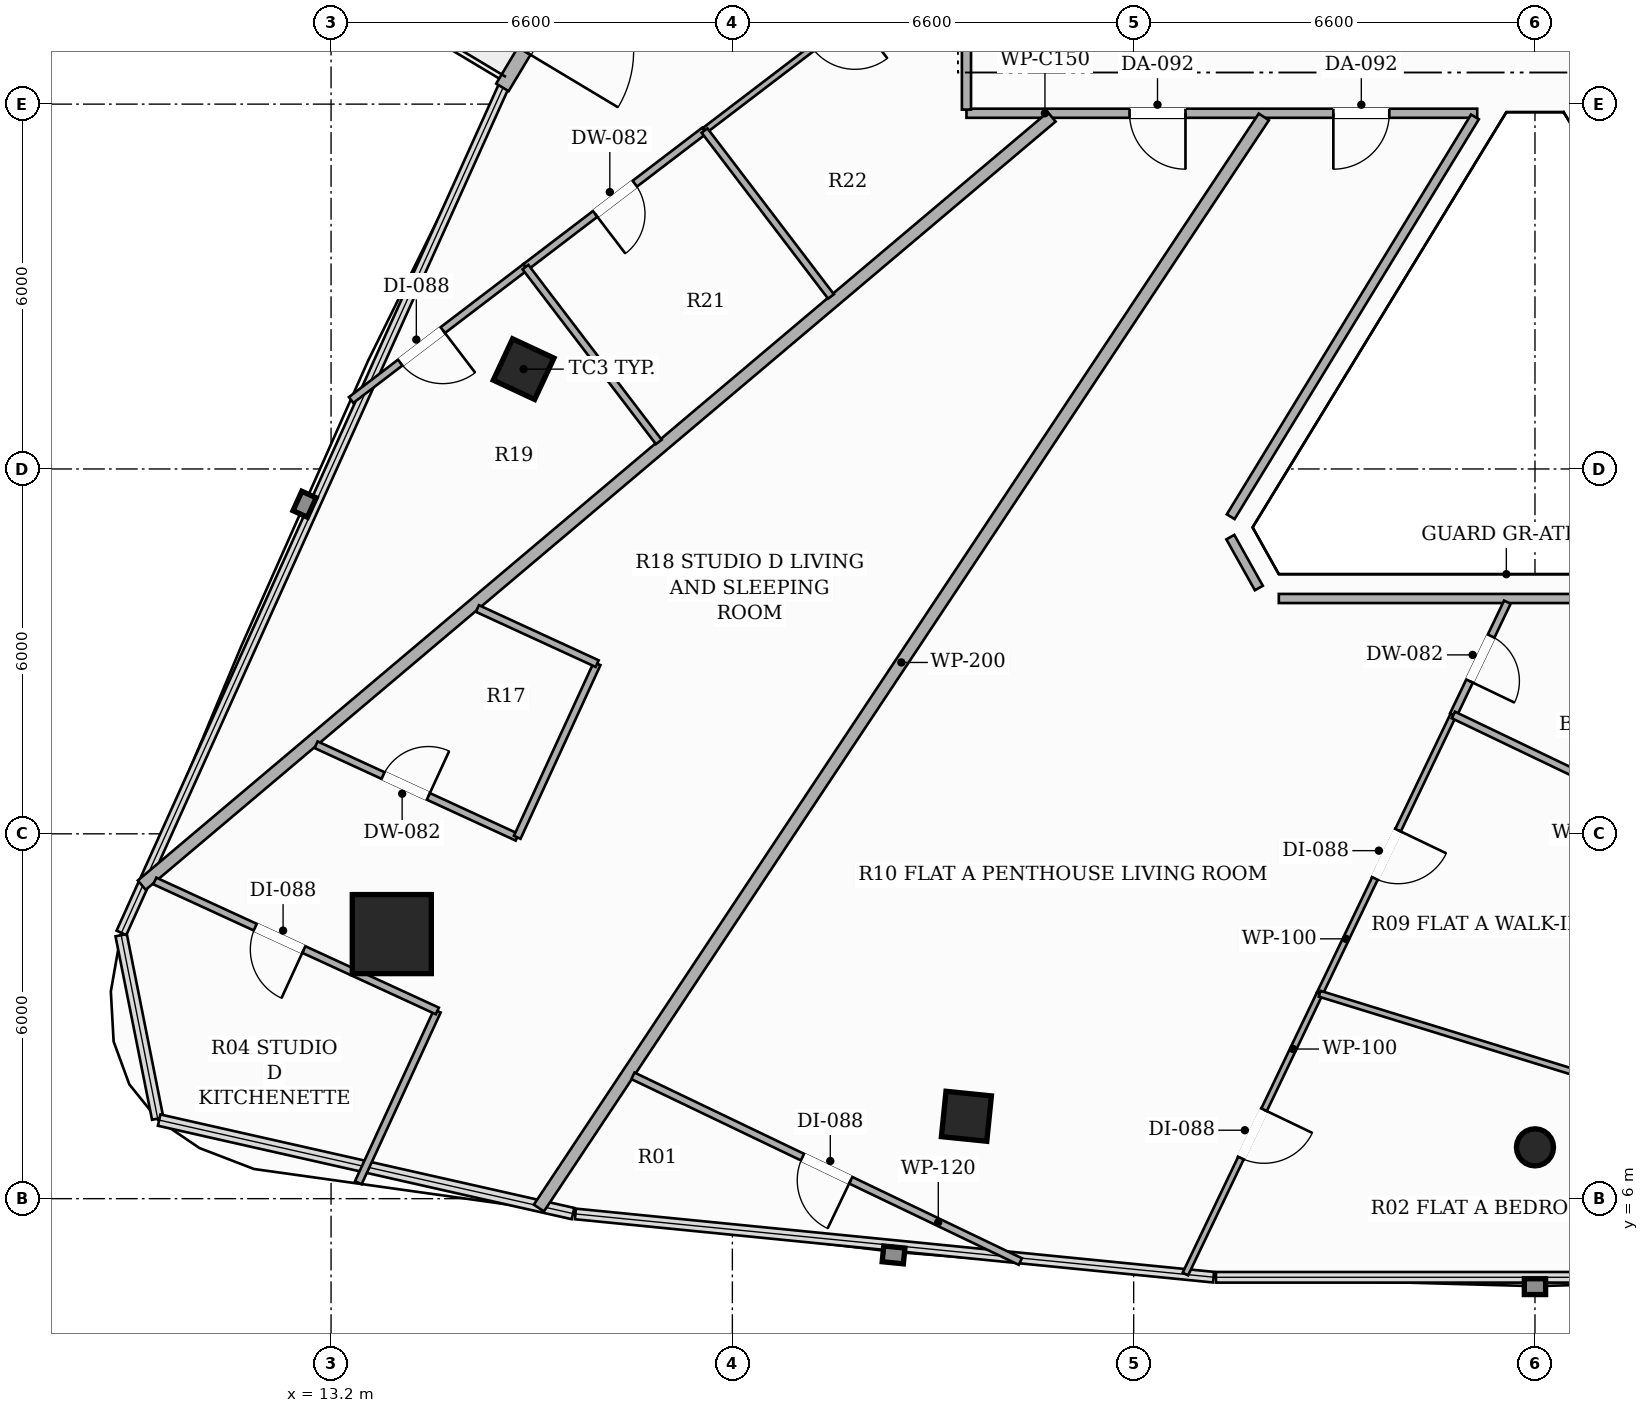
"""IFC4 building model, lengths in metres.
Left out: names, types, materials, properties, quantities, classifications, styles, units other than length and angle.
Written with IfcOpenShell. Run it as: python <this file> out.ifc"""

import sys

from ifc_helpers import new_model, si_unit, direction, frame, frame_2d, origin, origin_2d, place, context, subcontext, project, spatial, rectangle, hollow_rectangle, hollow_circle, extrude, element, fill, save


model = new_model("IFC4")
c1 = context("Model", 3, precision=1e-05, world=origin(), true_north=direction((0.0, 1.0)))
c2 = subcontext(c1, "Body", "Model", "MODEL_VIEW")
j1 = project(units=[si_unit("LENGTHUNIT", "METRE"), si_unit("PLANEANGLEUNIT", "RADIAN")], contexts=[c1])
p1 = place(None, origin())
s1 = spatial("IfcSite", under=j1, at=p1, CompositionType="ELEMENT")
p2 = place(p1, origin())
s2 = spatial("IfcBuilding", under=s1, at=p2, CompositionType="ELEMENT")
p3 = place(p2, frame((0.0, 0.0, 212.9)))
s3 = spatial("IfcBuildingStorey", under=s2, at=p3, CompositionType="ELEMENT", Elevation=212.9)
p4 = place(p3, frame((14.199, 10.351, 0.0), z_axis=(0.0, 0.0, 1.0), x_axis=(1.0, 0.0, 0.0)))
e1 = element("IfcColumn", 1, at=p4, inside=s3, PredefinedType="COLUMN", context=c2, shape_type="SweptSolid", body=[
    extrude(hollow_rectangle(XDim=1.3, YDim=1.3, WallThickness=0.04, at=origin_2d()), origin(), (0.0, 0.0, 1.0), 3.3),
])
for number, where, z_axis, x_axis in (
    (2, (16.367, 19.642, 0.0), (0.0, 0.0, 1.0), (0.423, 0.906, 0.0)),
    (3, (23.649, 7.355, 0.0), (0.0, 0.0, 1.0), (-0.995, 0.101, 0.0)),
):
    element("IfcColumn", number, at=place(p3, frame(where, z_axis=z_axis, x_axis=x_axis)), inside=s3, PredefinedType="COLUMN", context=c2, shape_type="SweptSolid", body=[
        extrude(hollow_rectangle(XDim=0.75, YDim=0.75, WallThickness=0.025, at=origin_2d()), origin(), (0.0, 0.0, 1.0), 3.3),
    ])
p5 = place(p3, frame((33.0, 6.844, 0.0), z_axis=(0.0, 0.0, 1.0), x_axis=(1.0, 0.0, 0.0)))
e4 = element("IfcColumn", 4, at=p5, inside=s3, PredefinedType="COLUMN", context=c2, shape_type="SweptSolid", body=[
    extrude(hollow_circle(Radius=0.305, WallThickness=0.016, at=origin_2d()), origin(), (0.0, 0.0, 1.0), 3.3),
])
p6 = place(p3, frame((21.353, 33.169, 0.0), z_axis=(0.0, 0.0, 1.0), x_axis=(-0.514391899557, -0.857555230682, 0.0)))
e5 = element("IfcWall", 5, at=p6, inside=s3, PredefinedType="SOLIDWALL", context=c2, shape_type="SweptSolid", body=[
    extrude(rectangle(XDim=10.371, YDim=0.24, at=frame_2d((5.186, 0.0))), origin(), (0.0, 0.0, 1.0), 2.624),
])
p7 = place(p6, frame((7.874, 0.0, 0.0)))
e6 = element("IfcOpeningElement", 6, at=p7, cuts=e5, PredefinedType="OPENING", context=c2, shape_type="SweptSolid", body=[
    extrude(rectangle(XDim=1.8, YDim=2.2, at=frame_2d((0.9, 1.1))), frame((0.0, 0.13, 0.0), z_axis=(0.0, -1.0, 0.0), x_axis=(1.0, 0.0, 0.0)), (0.0, 0.0, 1.0), 0.26),
])
p8 = place(p3, frame((32.05, 23.85, 0.0), z_axis=(0.0, 0.0, 1.0), x_axis=(-1.0, 0.0, 0.0)))
e7 = element("IfcWall", 7, at=p8, inside=s3, PredefinedType="PARTITIONING", context=c2, shape_type="SweptSolid", body=[
    extrude(rectangle(XDim=8.4, YDim=0.15, at=frame_2d((4.2, 0.0))), origin(), (0.0, 0.0, 1.0), 2.565),
])
p9 = place(p8, frame((1.446, 0.0, 0.0)))
e8 = element("IfcOpeningElement", 8, at=p9, cuts=e7, PredefinedType="OPENING", context=c2, shape_type="SweptSolid", body=[
    extrude(rectangle(XDim=0.92, YDim=2.15, at=frame_2d((0.46, 1.075))), frame((0.0, 0.085, 0.0), z_axis=(0.0, -1.0, 0.0), x_axis=(1.0, 0.0, 0.0)), (0.0, 0.0, 1.0), 0.17),
])
p10 = place(p8, frame((4.798, 0.0, 0.0)))
e9 = element("IfcOpeningElement", 9, at=p10, cuts=e7, PredefinedType="OPENING", context=c2, shape_type="SweptSolid", body=[
    extrude(rectangle(XDim=0.92, YDim=2.15, at=frame_2d((0.46, 1.075))), frame((0.0, 0.085, 0.0), z_axis=(0.0, -1.0, 0.0), x_axis=(1.0, 0.0, 0.0)), (0.0, 0.0, 1.0), 0.17),
])
p11 = place(p3, frame((23.65, 23.91, 0.0), z_axis=(0.0, 0.0, 1.0), x_axis=(0.0, 1.0, 0.0)))
e10 = element("IfcWall", 10, at=p11, inside=s3, PredefinedType="PARTITIONING", context=c2, shape_type="SweptSolid", body=[
    extrude(rectangle(XDim=12.439, YDim=0.15, at=frame_2d((6.22, 0.0))), origin(), (0.0, 0.0, 1.0), 2.492),
])
p12 = place(p11, frame((5.759, 0.0, 0.0)))
e11 = element("IfcOpeningElement", 11, at=p12, cuts=e10, PredefinedType="OPENING", context=c2, shape_type="SweptSolid", body=[
    extrude(rectangle(XDim=0.92, YDim=2.15, at=frame_2d((0.46, 1.075))), frame((0.0, 0.085, 0.0), z_axis=(0.0, -1.0, 0.0), x_axis=(1.0, 0.0, 0.0)), (0.0, 0.0, 1.0), 0.17),
])
p13 = place(p3, frame((37.213, 15.87, 0.0), z_axis=(0.0, 0.0, 1.0), x_axis=(-1.0, 0.0, 0.0)))
e12 = element("IfcWall", 12, at=p13, inside=s3, PredefinedType="PARTITIONING", context=c2, shape_type="SweptSolid", body=[
    extrude(rectangle(XDim=8.426, YDim=0.15, at=frame_2d((4.213, 0.0))), origin(), (0.0, 0.0, 1.0), 2.773),
])
p14 = place(p3, frame((28.459, 16.042, 0.0), z_axis=(0.0, 0.0, 1.0), x_axis=(-0.488859069364, 0.872362774481, 0.0)))
e13 = element("IfcWall", 13, at=p14, inside=s3, PredefinedType="PARTITIONING", context=c2, shape_type="SweptSolid", body=[
    extrude(rectangle(XDim=0.959, YDim=0.15, at=frame_2d((0.48, 0.0))), origin(), (0.0, 0.0, 1.0), 3.06),
])
p15 = place(p3, frame((27.996, 17.215, 0.0), z_axis=(0.0, 0.0, 1.0), x_axis=(0.521338496894, 0.853349970209, 0.0)))
e14 = element("IfcWall", 14, at=p15, inside=s3, PredefinedType="PARTITIONING", context=c2, shape_type="SweptSolid", body=[
    extrude(rectangle(XDim=7.705, YDim=0.15, at=frame_2d((3.853, 0.0))), origin(), (0.0, 0.0, 1.0), 2.773),
])
p16 = place(p3, frame((16.618, 5.846, 0.0), z_axis=(0.0, 0.0, 1.0), x_axis=(0.553425992232, 0.832898355817, 0.0)))
e15 = element("IfcWall", 15, at=p16, inside=s3, PredefinedType="PARTITIONING", context=c2, shape_type="SweptSolid", body=[
    extrude(rectangle(XDim=21.544, YDim=0.2, at=frame_2d((10.772, 0.0))), origin(), (0.0, 0.0, 1.0), 2.492),
])
p17 = place(p3, frame((10.087, 11.156, 0.0), z_axis=(0.0, 0.0, 1.0), x_axis=(0.76410924632, 0.645086862127, 0.0)))
e16 = element("IfcWall", 16, at=p17, inside=s3, PredefinedType="PARTITIONING", context=c2, shape_type="SweptSolid", body=[
    extrude(rectangle(XDim=19.585, YDim=0.2, at=frame_2d((9.792, 0.0))), origin(), (0.0, 0.0, 1.0), 2.492),
])
p18 = place(p3, frame((32.546, 15.81, 0.0), z_axis=(0.0, 0.0, 1.0), x_axis=(-0.43214833388, -0.90180253799, 0.0)))
e17 = element("IfcWall", 17, at=p18, inside=s3, PredefinedType="PARTITIONING", context=c2, shape_type="SweptSolid", body=[
    extrude(rectangle(XDim=2.057, YDim=0.12, at=frame_2d((1.028, 0.0))), origin(), (0.0, 0.0, 1.0), 3.06),
])
p19 = place(p18, frame((0.619, 0.0, 0.0)))
e18 = element("IfcOpeningElement", 18, at=p19, cuts=e17, PredefinedType="OPENING", context=c2, shape_type="SweptSolid", body=[
    extrude(rectangle(XDim=0.82, YDim=2.1, at=frame_2d((0.41, 1.05))), frame((0.0, 0.07, 0.0), z_axis=(0.0, -1.0, 0.0), x_axis=(1.0, 0.0, 0.0)), (0.0, 0.0, 1.0), 0.14),
])
p20 = place(p3, frame((24.536, 4.966, 0.0), z_axis=(0.0, 0.0, 1.0), x_axis=(-0.901746721557, 0.432264791721, 0.0)))
e19 = element("IfcWall", 19, at=p20, inside=s3, PredefinedType="PARTITIONING", context=c2, shape_type="SweptSolid", body=[
    extrude(rectangle(XDim=7.065, YDim=0.12, at=frame_2d((3.532, 0.0))), origin(), (0.0, 0.0, 1.0), 2.619),
])
p21 = place(p20, frame((3.093, 0.0, 0.0)))
e20 = element("IfcOpeningElement", 20, at=p21, cuts=e19, PredefinedType="OPENING", context=c2, shape_type="SweptSolid", body=[
    extrude(rectangle(XDim=0.88, YDim=2.1, at=frame_2d((0.44, 1.05))), frame((0.0, 0.07, 0.0), z_axis=(0.0, -1.0, 0.0), x_axis=(1.0, 0.0, 0.0)), (0.0, 0.0, 1.0), 0.14),
])
p22 = place(p3, frame((29.459, 9.37, 0.0), z_axis=(0.0, 0.0, 1.0), x_axis=(-0.43211613455, -0.901817967364, 0.0)))
e21 = element("IfcWall", 21, at=p22, inside=s3, PredefinedType="PARTITIONING", context=c2, shape_type="SweptSolid", body=[
    extrude(rectangle(XDim=5.112, YDim=0.1, at=frame_2d((2.556, 0.0))), origin(), (0.0, 0.0, 1.0), 2.492),
])
p23 = place(p22, frame((2.116, 0.0, 0.0)))
e22 = element("IfcOpeningElement", 22, at=p23, cuts=e21, PredefinedType="OPENING", context=c2, shape_type="SweptSolid", body=[
    extrude(rectangle(XDim=0.88, YDim=2.1, at=frame_2d((0.44, 1.05))), frame((0.0, 0.06, 0.0), z_axis=(0.0, -1.0, 0.0), x_axis=(1.0, 0.0, 0.0)), (0.0, 0.0, 1.0), 0.12),
])
p24 = place(p3, frame((31.657, 13.955, 0.0), z_axis=(0.0, 0.0, 1.0), x_axis=(-0.4322861352, -0.901736489954, 0.0)))
e23 = element("IfcWall", 23, at=p24, inside=s3, PredefinedType="PARTITIONING", context=c2, shape_type="SweptSolid", body=[
    extrude(rectangle(XDim=5.084, YDim=0.1, at=frame_2d((2.542, 0.0))), origin(), (0.0, 0.0, 1.0), 3.06),
])
p25 = place(p24, frame((2.102, 0.0, 0.0)))
e24 = element("IfcOpeningElement", 24, at=p25, cuts=e23, PredefinedType="OPENING", context=c2, shape_type="SweptSolid", body=[
    extrude(rectangle(XDim=0.88, YDim=2.1, at=frame_2d((0.44, 1.05))), frame((0.0, 0.06, 0.0), z_axis=(0.0, -1.0, 0.0), x_axis=(1.0, 0.0, 0.0)), (0.0, 0.0, 1.0), 0.12),
])
p26 = place(p3, frame((36.133, 11.81, 0.0), z_axis=(0.0, 0.0, 1.0), x_axis=(-0.901797658679, 0.432158515826, 0.0)))
e25 = element("IfcWall", 25, at=p26, inside=s3, PredefinedType="PARTITIONING", context=c2, shape_type="SweptSolid", body=[
    extrude(rectangle(XDim=4.964, YDim=0.12, at=frame_2d((2.482, 0.0))), origin(), (0.0, 0.0, 1.0), 2.773),
])
p27 = place(p3, frame((29.459, 9.37, 0.0), z_axis=(0.0, 0.0, 1.0), x_axis=(0.955559226726, -0.294799193044, 0.0)))
e26 = element("IfcWall", 26, at=p27, inside=s3, PredefinedType="PARTITIONING", context=c2, shape_type="SweptSolid", body=[
    extrude(rectangle(XDim=7.839, YDim=0.1, at=frame_2d((3.92, 0.0))), origin(), (0.0, 0.0, 1.0), 2.492),
])
p28 = place(p3, frame((12.954, 13.465, 0.0), z_axis=(0.0, 0.0, 1.0), x_axis=(0.908453283004, -0.41798640241, 0.0)))
e27 = element("IfcWall", 27, at=p28, inside=s3, PredefinedType="PARTITIONING", context=c2, shape_type="SweptSolid", body=[
    extrude(rectangle(XDim=3.641, YDim=0.12, at=frame_2d((1.821, 0.0))), origin(), (0.0, 0.0, 1.0), 2.492),
])
p29 = place(p28, frame((1.212, 0.0, 0.0)))
e28 = element("IfcOpeningElement", 28, at=p29, cuts=e27, PredefinedType="OPENING", context=c2, shape_type="SweptSolid", body=[
    extrude(rectangle(XDim=0.82, YDim=2.1, at=frame_2d((0.41, 1.05))), frame((0.0, 0.07, 0.0), z_axis=(0.0, -1.0, 0.0), x_axis=(1.0, 0.0, 0.0)), (0.0, 0.0, 1.0), 0.14),
])
p30 = place(p3, frame((16.262, 11.943, 0.0), z_axis=(0.0, 0.0, 1.0), x_axis=(0.417964576431, 0.908463324988, 0.0)))
e29 = element("IfcWall", 29, at=p30, inside=s3, PredefinedType="PARTITIONING", context=c2, shape_type="SweptSolid", body=[
    extrude(rectangle(XDim=3.144, YDim=0.12, at=frame_2d((1.572, 0.0))), origin(), (0.0, 0.0, 1.0), 2.565),
])
p31 = place(p3, frame((17.576, 14.799, 0.0), z_axis=(0.0, 0.0, 1.0), x_axis=(-0.908443405033, 0.418007870562, 0.0)))
e30 = element("IfcWall", 30, at=p31, inside=s3, PredefinedType="PARTITIONING", context=c2, shape_type="SweptSolid", body=[
    extrude(rectangle(XDim=2.167, YDim=0.12, at=frame_2d((1.084, 0.0))), origin(), (0.0, 0.0, 1.0), 2.492),
])
p32 = place(p3, frame((13.648, 6.262, 0.0), z_axis=(0.0, 0.0, 1.0), x_axis=(0.418057228076, 0.90842069222, 0.0)))
e31 = element("IfcWall", 31, at=p32, inside=s3, PredefinedType="PARTITIONING", context=c2, shape_type="SweptSolid", body=[
    extrude(rectangle(XDim=3.11, YDim=0.12, at=frame_2d((1.555, 0.0))), origin(), (0.0, 0.0, 1.0), 3.06),
])
p33 = place(p3, frame((14.948, 9.087, 0.0), z_axis=(0.0, 0.0, 1.0), x_axis=(-0.908447683715, 0.417998571712, 0.0)))
e32 = element("IfcWall", 32, at=p33, inside=s3, PredefinedType="PARTITIONING", context=c2, shape_type="SweptSolid", body=[
    extrude(rectangle(XDim=5.115, YDim=0.12, at=frame_2d((2.558, 0.0))), origin(), (0.0, 0.0, 1.0), 3.06),
])
p34 = place(p33, frame((2.417, 0.0, 0.0)))
e33 = element("IfcOpeningElement", 33, at=p34, cuts=e32, PredefinedType="OPENING", context=c2, shape_type="SweptSolid", body=[
    extrude(rectangle(XDim=0.88, YDim=2.1, at=frame_2d((0.44, 1.05))), frame((0.0, 0.07, 0.0), z_axis=(0.0, -1.0, 0.0), x_axis=(1.0, 0.0, 0.0)), (0.0, 0.0, 1.0), 0.14),
])
p35 = place(p3, frame((19.342, 23.566, 0.0), z_axis=(0.0, 0.0, 1.0), x_axis=(-0.795172892053, -0.606382776589, 0.0)))
e34 = element("IfcWall", 34, at=p35, inside=s3, PredefinedType="PARTITIONING", context=c2, shape_type="SweptSolid", body=[
    extrude(rectangle(XDim=3.704, YDim=0.12, at=frame_2d((1.852, 0.0))), origin(), (0.0, 0.0, 1.0), 2.492),
])
p36 = place(p35, frame((1.442, 0.0, 0.0)))
e35 = element("IfcOpeningElement", 35, at=p36, cuts=e34, PredefinedType="OPENING", context=c2, shape_type="SweptSolid", body=[
    extrude(rectangle(XDim=0.82, YDim=2.1, at=frame_2d((0.41, 1.05))), frame((0.0, 0.07, 0.0), z_axis=(0.0, -1.0, 0.0), x_axis=(1.0, 0.0, 0.0)), (0.0, 0.0, 1.0), 0.14),
])
p37 = place(p3, frame((16.397, 21.32, 0.0), z_axis=(0.0, 0.0, 1.0), x_axis=(-0.795204709159, -0.606341051333, 0.0)))
e36 = element("IfcWall", 36, at=p37, inside=s3, PredefinedType="PARTITIONING", context=c2, shape_type="SweptSolid", body=[
    extrude(rectangle(XDim=3.605, YDim=0.12, at=frame_2d((1.803, 0.0))), origin(), (0.0, 0.0, 1.0), 3.06),
])
p38 = place(p37, frame((1.71, 0.0, 0.0)))
e37 = element("IfcOpeningElement", 37, at=p38, cuts=e36, PredefinedType="OPENING", context=c2, shape_type="SweptSolid", body=[
    extrude(rectangle(XDim=0.88, YDim=2.1, at=frame_2d((0.44, 1.05))), frame((0.0, 0.07, 0.0), z_axis=(0.0, -1.0, 0.0), x_axis=(1.0, 0.0, 0.0)), (0.0, 0.0, 1.0), 0.14),
])
p39 = place(p3, frame((23.59, 26.805, 0.0), z_axis=(0.0, 0.0, 1.0), x_axis=(-0.795214502583, -0.606328207228, 0.0)))
e38 = element("IfcWall", 38, at=p39, inside=s3, PredefinedType="PARTITIONING", context=c2, shape_type="SweptSolid", body=[
    extrude(rectangle(XDim=5.342, YDim=0.1, at=frame_2d((2.671, 0.0))), origin(), (0.0, 0.0, 1.0), 2.773),
])
p40 = place(p39, frame((2.231, 0.0, 0.0)))
e39 = element("IfcOpeningElement", 39, at=p40, cuts=e38, PredefinedType="OPENING", context=c2, shape_type="SweptSolid", body=[
    extrude(rectangle(XDim=0.88, YDim=2.1, at=frame_2d((0.44, 1.05))), frame((0.0, 0.06, 0.0), z_axis=(0.0, -1.0, 0.0), x_axis=(1.0, 0.0, 0.0)), (0.0, 0.0, 1.0), 0.12),
])
p41 = place(p3, frame((18.59, 18.445, 0.0), z_axis=(0.0, 0.0, 1.0), x_axis=(-0.606504882674, 0.795079761591, 0.0)))
e40 = element("IfcWall", 40, at=p41, inside=s3, PredefinedType="PARTITIONING", context=c2, shape_type="SweptSolid", body=[
    extrude(rectangle(XDim=3.616, YDim=0.12, at=frame_2d((1.808, 0.0))), origin(), (0.0, 0.0, 1.0), 2.492),
])
p42 = place(p3, frame((19.342, 23.566, 0.0), z_axis=(0.0, 0.0, 1.0), x_axis=(0.60619754922, -0.795314108589, 0.0)))
e41 = element("IfcWall", 41, at=p42, inside=s3, PredefinedType="PARTITIONING", context=c2, shape_type="SweptSolid", body=[
    extrude(rectangle(XDim=3.431, YDim=0.12, at=frame_2d((1.716, 0.0))), origin(), (0.0, 0.0, 1.0), 2.773),
])
p43 = place(p9, origin())
e42 = element("IfcDoor", 42, at=p43, inside=s3, OperationType="SINGLE_SWING_RIGHT", PredefinedType="DOOR", context=c2, shape_type="SweptSolid", body=[
    extrude(rectangle(XDim=0.92, YDim=2.15, at=frame_2d((0.46, 1.075))), frame((0.0, 0.025, 0.0), z_axis=(0.0, -1.0, 0.0), x_axis=(1.0, 0.0, 0.0)), (0.0, 0.0, 1.0), 0.05),
])
fill(e8, e42)
p44 = place(p19, origin())
e43 = element("IfcDoor", 43, at=p44, inside=s3, OperationType="SINGLE_SWING_RIGHT", PredefinedType="DOOR", context=c2, shape_type="SweptSolid", body=[
    extrude(rectangle(XDim=0.82, YDim=2.1, at=frame_2d((0.41, 1.05))), frame((0.0, 0.025, 0.0), z_axis=(0.0, -1.0, 0.0), x_axis=(1.0, 0.0, 0.0)), (0.0, 0.0, 1.0), 0.05),
])
fill(e18, e43)
p45 = place(p21, origin())
e44 = element("IfcDoor", 44, at=p45, inside=s3, OperationType="SINGLE_SWING_LEFT", PredefinedType="DOOR", context=c2, shape_type="SweptSolid", body=[
    extrude(rectangle(XDim=0.88, YDim=2.1, at=frame_2d((0.44, 1.05))), frame((0.0, 0.025, 0.0), z_axis=(0.0, -1.0, 0.0), x_axis=(1.0, 0.0, 0.0)), (0.0, 0.0, 1.0), 0.05),
])
fill(e20, e44)
p46 = place(p23, origin())
e45 = element("IfcDoor", 45, at=p46, inside=s3, OperationType="SINGLE_SWING_LEFT", PredefinedType="DOOR", context=c2, shape_type="SweptSolid", body=[
    extrude(rectangle(XDim=0.88, YDim=2.1, at=frame_2d((0.44, 1.05))), frame((0.0, 0.025, 0.0), z_axis=(0.0, -1.0, 0.0), x_axis=(1.0, 0.0, 0.0)), (0.0, 0.0, 1.0), 0.05),
])
fill(e22, e45)
p47 = place(p25, origin())
e46 = element("IfcDoor", 46, at=p47, inside=s3, OperationType="SINGLE_SWING_LEFT", PredefinedType="DOOR", context=c2, shape_type="SweptSolid", body=[
    extrude(rectangle(XDim=0.88, YDim=2.1, at=frame_2d((0.44, 1.05))), frame((0.0, 0.025, 0.0), z_axis=(0.0, -1.0, 0.0), x_axis=(1.0, 0.0, 0.0)), (0.0, 0.0, 1.0), 0.05),
])
fill(e24, e46)
p48 = place(p10, origin())
e47 = element("IfcDoor", 47, at=p48, inside=s3, OperationType="SINGLE_SWING_LEFT", PredefinedType="DOOR", context=c2, shape_type="SweptSolid", body=[
    extrude(rectangle(XDim=0.92, YDim=2.15, at=frame_2d((0.46, 1.075))), frame((0.0, 0.025, 0.0), z_axis=(0.0, -1.0, 0.0), x_axis=(1.0, 0.0, 0.0)), (0.0, 0.0, 1.0), 0.05),
])
fill(e9, e47)
p49 = place(p29, origin())
e48 = element("IfcDoor", 48, at=p49, inside=s3, OperationType="SINGLE_SWING_RIGHT", PredefinedType="DOOR", context=c2, shape_type="SweptSolid", body=[
    extrude(rectangle(XDim=0.82, YDim=2.1, at=frame_2d((0.41, 1.05))), frame((0.0, 0.025, 0.0), z_axis=(0.0, -1.0, 0.0), x_axis=(1.0, 0.0, 0.0)), (0.0, 0.0, 1.0), 0.05),
])
fill(e28, e48)
p50 = place(p34, origin())
e49 = element("IfcDoor", 49, at=p50, inside=s3, OperationType="SINGLE_SWING_LEFT", PredefinedType="DOOR", context=c2, shape_type="SweptSolid", body=[
    extrude(rectangle(XDim=0.88, YDim=2.1, at=frame_2d((0.44, 1.05))), frame((0.0, 0.025, 0.0), z_axis=(0.0, -1.0, 0.0), x_axis=(1.0, 0.0, 0.0)), (0.0, 0.0, 1.0), 0.05),
])
fill(e33, e49)
p51 = place(p36, origin())
e50 = element("IfcDoor", 50, at=p51, inside=s3, OperationType="SINGLE_SWING_RIGHT", PredefinedType="DOOR", context=c2, shape_type="SweptSolid", body=[
    extrude(rectangle(XDim=0.82, YDim=2.1, at=frame_2d((0.41, 1.05))), frame((0.0, 0.025, 0.0), z_axis=(0.0, -1.0, 0.0), x_axis=(1.0, 0.0, 0.0)), (0.0, 0.0, 1.0), 0.05),
])
fill(e35, e50)
p52 = place(p38, origin())
e51 = element("IfcDoor", 51, at=p52, inside=s3, OperationType="SINGLE_SWING_LEFT", PredefinedType="DOOR", context=c2, shape_type="SweptSolid", body=[
    extrude(rectangle(XDim=0.88, YDim=2.1, at=frame_2d((0.44, 1.05))), frame((0.0, 0.025, 0.0), z_axis=(0.0, -1.0, 0.0), x_axis=(1.0, 0.0, 0.0)), (0.0, 0.0, 1.0), 0.05),
])
fill(e37, e51)
save(model, sys.argv[1])
